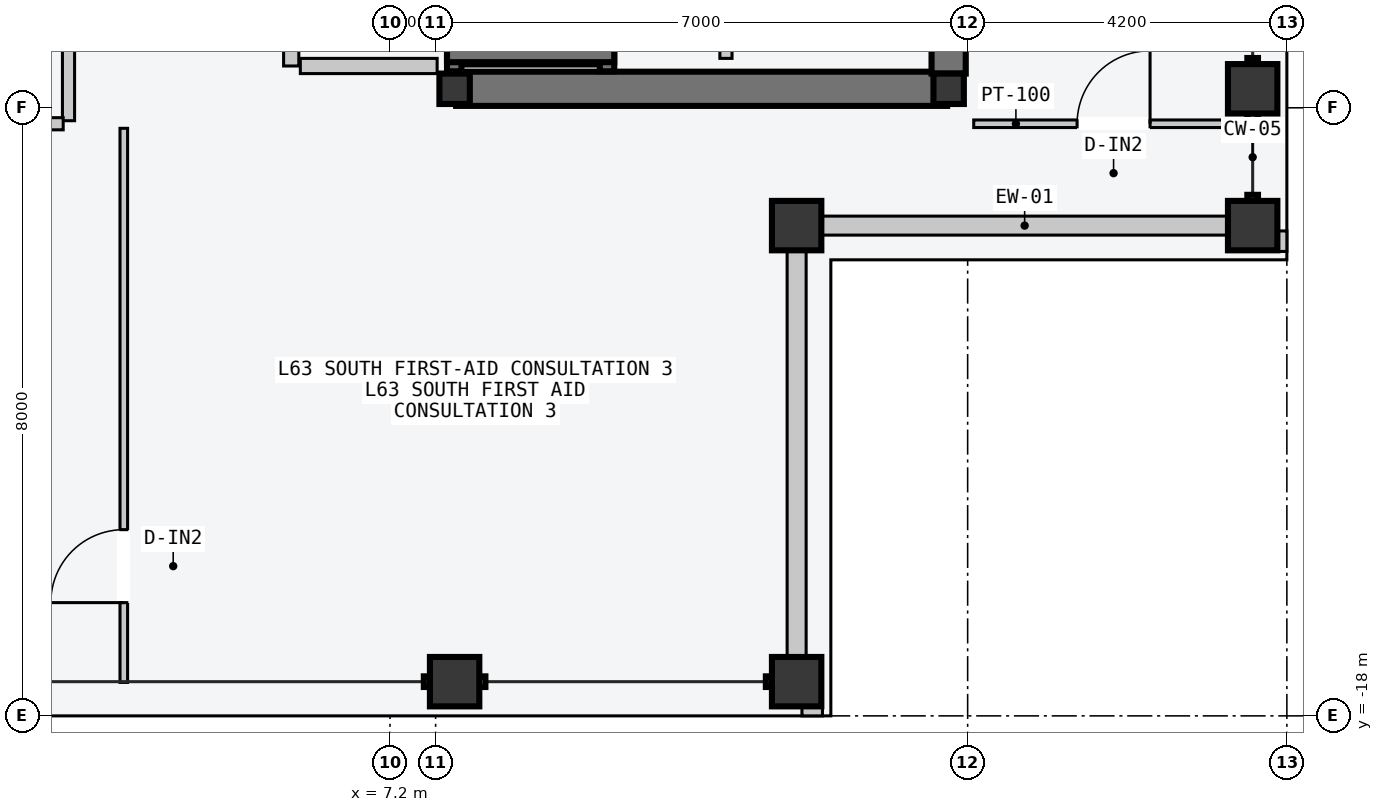
"""IFC4 building model, lengths in metres.
Left out: names, types, materials, properties, quantities, classifications, styles, units other than length and angle.
Written with IfcOpenShell. Run it as: python <this file> out.ifc"""

import sys

from ifc_helpers import new_model, si_unit, direction, frame, frame_2d, origin, origin_2d, place, context, subcontext, project, spatial, rectangle, hollow_rectangle, i_section, extrude, element, fill, save


model = new_model("IFC4")
c1 = context("Model", 3, precision=1e-05, world=origin(), true_north=direction((0.0, 1.0)))
c2 = subcontext(c1, "Body", "Model", "MODEL_VIEW")
j1 = project(units=[si_unit("LENGTHUNIT", "METRE"), si_unit("PLANEANGLEUNIT", "RADIAN")], contexts=[c1])
p1 = place(None, origin())
s1 = spatial("IfcSite", under=j1, at=p1, CompositionType="ELEMENT")
p2 = place(p1, origin())
s2 = spatial("IfcBuilding", under=s1, at=p2, CompositionType="ELEMENT")
p3 = place(p2, frame((0.0, 0.0, 240.0)))
s3 = spatial("IfcBuildingStorey", under=s2, at=p3, CompositionType="ELEMENT", Elevation=240.0)
p4 = place(p3, frame((8.07, -9.75, -0.2), z_axis=(0.0, 0.0, 1.0), x_axis=(1.0, 0.0, 0.0)))
e1 = element("IfcWall", 1, at=p4, inside=s3, PredefinedType="SHEAR", context=c2, shape_type="SweptSolid", body=[
    extrude(rectangle(XDim=6.46, YDim=0.45, at=frame_2d((3.23, 0.0))), origin(), (0.0, 0.0, 1.0), 3.6),
])
p5 = place(p3, frame((14.55, -9.55, -0.2), z_axis=(0.0, 0.0, 1.0), x_axis=(0.0, 1.0, 0.0)))
e2 = element("IfcWall", 2, at=p5, inside=s3, PredefinedType="SHEAR", context=c2, shape_type="SweptSolid", body=[
    extrude(rectangle(XDim=9.35, YDim=0.45, at=frame_2d((4.675, 0.0))), origin(), (0.0, 0.0, 1.0), 3.6),
])
for number, where, z_axis, x_axis in (
    (3, (8.05, -9.75, 0.0), (0.0, 0.0, 1.0), (1.0, 0.0, 0.0)),
    (4, (14.55, -9.75, 0.0), (0.0, 0.0, 1.0), (1.0, 0.0, 0.0)),
):
    element("IfcColumn", number, at=place(p3, frame(where, z_axis=z_axis, x_axis=x_axis)), inside=s3, PredefinedType="COLUMN", context=c2, shape_type="SweptSolid", body=[
        extrude(i_section(OverallWidth=0.4, OverallDepth=0.4, WebThickness=0.013, FlangeThickness=0.021, at=origin_2d()), origin(), (0.0, 0.0, 1.0), 3.6),
    ])
for number, where, z_axis, x_axis in (
    (5, (8.05, -17.55, 0.0), (0.0, 0.0, 1.0), (1.0, 0.0, 0.0)),
    (6, (12.55, -17.55, 0.0), (0.0, 0.0, 1.0), (1.0, 0.0, 0.0)),
    (7, (18.55, -11.55, 0.0), (0.0, 0.0, 1.0), (0.0, 1.0, 0.0)),
    (8, (18.55, -9.75, 0.0), (0.0, 0.0, 1.0), (0.0, 1.0, 0.0)),
    (9, (12.55, -11.55, 0.0), (0.0, 0.0, 1.0), (1.0, 0.0, 0.0)),
):
    element("IfcColumn", number, at=place(p3, frame(where, z_axis=z_axis, x_axis=x_axis)), inside=s3, PredefinedType="COLUMN", context=c2, shape_type="SweptSolid", body=[
        extrude(hollow_rectangle(XDim=0.65, YDim=0.65, WallThickness=0.028, at=origin_2d()), origin(), (0.0, 0.0, 1.0), 3.6),
    ])
for number, where, z_axis, x_axis in (
    (10, (12.885, -11.55, 0.0), (0.0, 0.0, 1.0), (1.0, 0.0, 0.0)),
    (11, (12.55, -17.215, 0.0), (0.0, 0.0, 1.0), (0.0, 1.0, 0.0)),
):
    element("IfcWall", number, at=place(p3, frame(where, z_axis=z_axis, x_axis=x_axis)), inside=s3, PredefinedType="STANDARD", context=c2, shape_type="SweptSolid", body=[
        extrude(rectangle(XDim=5.33, YDim=0.25, at=frame_2d((2.665, 0.0))), origin(), (0.0, 0.0, 1.0), 2.85),
    ])
for number, where, z_axis, x_axis in (
    (12, (12.62, -17.89, 0.0), (0.0, 0.0, 1.0), (1.0, 0.0, 0.0)),
    (13, (18.89, -11.89, 0.0), (0.0, 0.0, 1.0), (0.0, 1.0, 0.0)),
):
    element("IfcWall", number, at=place(p3, frame(where, z_axis=z_axis, x_axis=x_axis)), inside=s3, PredefinedType="PARAPET", context=c2, shape_type="SweptSolid", body=[
        extrude(rectangle(XDim=0.27, YDim=0.22, at=frame_2d((0.135, 0.0))), origin(), (0.0, 0.0, 1.0), 1.2),
    ])
p6 = place(p3, frame((8.045, -9.52, -0.2), z_axis=(0.0, 0.0, 1.0), x_axis=(0.0, 1.0, 0.0)))
e14 = element("IfcWall", 14, at=p6, inside=s3, PredefinedType="SOLIDWALL", context=c2, shape_type="SweptSolid", body=[
    extrude(rectangle(XDim=2.12, YDim=0.19, at=frame_2d((1.06, 0.0))), origin(), (0.0, 0.0, 1.0), 3.6),
])
p7 = place(p6, frame((0.57, 0.0, 0.2)))
e15 = element("IfcOpeningElement", 15, at=p7, cuts=e14, PredefinedType="OPENING", context=c2, shape_type="SweptSolid", body=[
    extrude(rectangle(XDim=1.1, YDim=2.2, at=frame_2d((0.55, 1.1))), frame((0.0, 0.105, 0.0), z_axis=(0.0, -1.0, 0.0), x_axis=(1.0, 0.0, 0.0)), (0.0, 0.0, 1.0), 0.21),
])
p8 = place(p3, frame((10.055, -9.52, -0.2), z_axis=(0.0, 0.0, 1.0), x_axis=(0.0, 1.0, 0.0)))
e16 = element("IfcWall", 16, at=p8, inside=s3, PredefinedType="SOLIDWALL", context=c2, shape_type="SweptSolid", body=[
    extrude(rectangle(XDim=2.12, YDim=0.19, at=frame_2d((1.06, 0.0))), origin(), (0.0, 0.0, 1.0), 3.6),
])
p9 = place(p3, frame((7.95, -9.305, -0.2), z_axis=(0.0, 0.0, 1.0), x_axis=(1.0, 0.0, 0.0)))
e17 = element("IfcWall", 17, at=p9, inside=s3, PredefinedType="SOLIDWALL", context=c2, shape_type="SweptSolid", body=[
    extrude(rectangle(XDim=2.2, YDim=0.19, at=frame_2d((1.1, 0.0))), origin(), (0.0, 0.0, 1.0), 3.6),
])
p10 = place(p3, frame((5.9, -9.45, 0.0), z_axis=(0.0, 0.0, 1.0), x_axis=(0.0, 1.0, 0.0)))
e18 = element("IfcWall", 18, at=p10, inside=s3, PredefinedType="PARTITIONING", context=c2, shape_type="SweptSolid", body=[
    extrude(rectangle(XDim=10.5, YDim=0.2, at=frame_2d((5.25, 0.0))), origin(), (0.0, 0.0, 1.0), 3.4),
])
p11 = place(p10, frame((3.9, 0.0, 0.0)))
e19 = element("IfcOpeningElement", 19, at=p11, cuts=e18, PredefinedType="OPENING", context=c2, shape_type="SweptSolid", body=[
    extrude(rectangle(XDim=1.5, YDim=2.2, at=frame_2d((0.75, 1.1))), frame((0.0, 0.11, 0.0), z_axis=(0.0, -1.0, 0.0), x_axis=(1.0, 0.0, 0.0)), (0.0, 0.0, 1.0), 0.22),
])
p12 = place(p3, frame((6.02, -9.45, 0.0), z_axis=(0.0, 0.0, 1.0), x_axis=(1.0, 0.0, 0.0)))
e20 = element("IfcWall", 20, at=p12, inside=s3, PredefinedType="PARTITIONING", context=c2, shape_type="SweptSolid", body=[
    extrude(rectangle(XDim=1.8, YDim=0.2, at=frame_2d((0.9, 0.0))), origin(), (0.0, 0.0, 1.0), 3.4),
])
p13 = place(p3, frame((11.62, -9.35, 0.0), z_axis=(0.0, 0.0, 1.0), x_axis=(0.0, 1.0, 0.0)))
e21 = element("IfcWall", 21, at=p13, inside=s3, PredefinedType="PARTITIONING", context=c2, shape_type="SweptSolid", body=[
    extrude(rectangle(XDim=3.85, YDim=0.16, at=frame_2d((1.925, 0.0))), origin(), (0.0, 0.0, 1.0), 3.4),
])
p14 = place(p13, frame((0.3, 0.0, 0.0)))
e22 = element("IfcOpeningElement", 22, at=p14, cuts=e21, PredefinedType="OPENING", context=c2, shape_type="SweptSolid", body=[
    extrude(rectangle(XDim=0.85, YDim=2.12, at=frame_2d((0.425, 1.06))), frame((0.0, 0.09, 0.0), z_axis=(0.0, -1.0, 0.0), x_axis=(1.0, 0.0, 0.0)), (0.0, 0.0, 1.0), 0.18),
])
p15 = place(p13, frame((1.5, 0.0, 0.0)))
e23 = element("IfcOpeningElement", 23, at=p15, cuts=e21, PredefinedType="OPENING", context=c2, shape_type="SweptSolid", body=[
    extrude(rectangle(XDim=0.85, YDim=2.12, at=frame_2d((0.425, 1.06))), frame((0.0, 0.09, 0.0), z_axis=(0.0, -1.0, 0.0), x_axis=(1.0, 0.0, 0.0)), (0.0, 0.0, 1.0), 0.18),
])
p16 = place(p13, frame((2.7, 0.0, 0.0)))
e24 = element("IfcOpeningElement", 24, at=p16, cuts=e21, PredefinedType="OPENING", context=c2, shape_type="SweptSolid", body=[
    extrude(rectangle(XDim=0.85, YDim=2.12, at=frame_2d((0.425, 1.06))), frame((0.0, 0.09, 0.0), z_axis=(0.0, -1.0, 0.0), x_axis=(1.0, 0.0, 0.0)), (0.0, 0.0, 1.0), 0.18),
])
p17 = place(p3, frame((2.97, -10.17, 0.0), z_axis=(0.0, 0.0, 1.0), x_axis=(0.0, 1.0, 0.0)))
e25 = element("IfcWall", 25, at=p17, inside=s3, PredefinedType="PARTITIONING", context=c2, shape_type="SweptSolid", body=[
    extrude(rectangle(XDim=4.49, YDim=0.16, at=frame_2d((2.245, 0.0))), origin(), (0.0, 0.0, 1.0), 3.4),
])
p18 = place(p17, frame((1.15, 0.0, 0.0)))
e26 = element("IfcOpeningElement", 26, at=p18, cuts=e25, PredefinedType="OPENING", context=c2, shape_type="SweptSolid", body=[
    extrude(rectangle(XDim=0.96, YDim=2.18, at=frame_2d((0.48, 1.09))), frame((0.0, 0.09, 0.0), z_axis=(0.0, -1.0, 0.0), x_axis=(1.0, 0.0, 0.0)), (0.0, 0.0, 1.0), 0.18),
])
p19 = place(p3, frame((3.698, -17.56, 0.0), z_axis=(0.0, 0.0, 1.0), x_axis=(0.0, 1.0, 0.0)))
e27 = element("IfcWall", 27, at=p19, inside=s3, PredefinedType="PARTITIONING", context=c2, shape_type="SweptSolid", body=[
    extrude(rectangle(XDim=7.29, YDim=0.1, at=frame_2d((3.645, 0.0))), origin(), (0.0, 0.0, 1.0), 3.4),
])
p20 = place(p19, frame((1.05, 0.0, 0.0)))
e28 = element("IfcOpeningElement", 28, at=p20, cuts=e27, PredefinedType="OPENING", context=c2, shape_type="SweptSolid", body=[
    extrude(rectangle(XDim=0.96, YDim=2.18, at=frame_2d((0.48, 1.09))), frame((0.0, 0.06, 0.0), z_axis=(0.0, -1.0, 0.0), x_axis=(1.0, 0.0, 0.0)), (0.0, 0.0, 1.0), 0.12),
])
p21 = place(p3, frame((0.6, -10.21, 0.0), z_axis=(0.0, 0.0, 1.0), x_axis=(1.0, 0.0, 0.0)))
e29 = element("IfcWall", 29, at=p21, inside=s3, PredefinedType="PARTITIONING", context=c2, shape_type="SweptSolid", body=[
    extrude(rectangle(XDim=2.3, YDim=0.16, at=frame_2d((1.15, 0.0))), origin(), (0.0, 0.0, 1.0), 3.4),
])
p22 = place(p21, frame((0.62, 0.0, 0.0)))
e30 = element("IfcOpeningElement", 30, at=p22, cuts=e29, PredefinedType="OPENING", context=c2, shape_type="SweptSolid", body=[
    extrude(rectangle(XDim=1.06, YDim=2.2, at=frame_2d((0.53, 1.1))), frame((0.0, 0.09, 0.0), z_axis=(0.0, -1.0, 0.0), x_axis=(1.0, 0.0, 0.0)), (0.0, 0.0, 1.0), 0.18),
])
p23 = place(p3, frame((14.88, -10.21, 0.0), z_axis=(0.0, 0.0, 1.0), x_axis=(1.0, 0.0, 0.0)))
e31 = element("IfcWall", 31, at=p23, inside=s3, PredefinedType="PARTITIONING", context=c2, shape_type="SweptSolid", body=[
    extrude(rectangle(XDim=3.68, YDim=0.1, at=frame_2d((1.84, 0.0))), origin(), (0.0, 0.0, 1.0), 3.4),
])
p24 = place(p23, frame((1.36, 0.0, 0.0)))
e32 = element("IfcOpeningElement", 32, at=p24, cuts=e31, PredefinedType="OPENING", context=c2, shape_type="SweptSolid", body=[
    extrude(rectangle(XDim=0.96, YDim=2.18, at=frame_2d((0.48, 1.09))), frame((0.0, 0.06, 0.0), z_axis=(0.0, -1.0, 0.0), x_axis=(1.0, 0.0, 0.0)), (0.0, 0.0, 1.0), 0.12),
])
p25 = place(p20, origin())
e33 = element("IfcDoor", 33, at=p25, inside=s3, OperationType="SINGLE_SWING_LEFT", PredefinedType="DOOR", context=c2, shape_type="SweptSolid", body=[
    extrude(rectangle(XDim=0.96, YDim=2.18, at=frame_2d((0.48, 1.09))), frame((0.0, 0.025, 0.0), z_axis=(0.0, -1.0, 0.0), x_axis=(1.0, 0.0, 0.0)), (0.0, 0.0, 1.0), 0.05),
])
fill(e28, e33)
p26 = place(p24, origin())
e34 = element("IfcDoor", 34, at=p26, inside=s3, OperationType="SINGLE_SWING_RIGHT", PredefinedType="DOOR", context=c2, shape_type="SweptSolid", body=[
    extrude(rectangle(XDim=0.96, YDim=2.18, at=frame_2d((0.48, 1.09))), frame((0.0, 0.025, 0.0), z_axis=(0.0, -1.0, 0.0), x_axis=(1.0, 0.0, 0.0)), (0.0, 0.0, 1.0), 0.05),
])
fill(e32, e34)
save(model, sys.argv[1])
